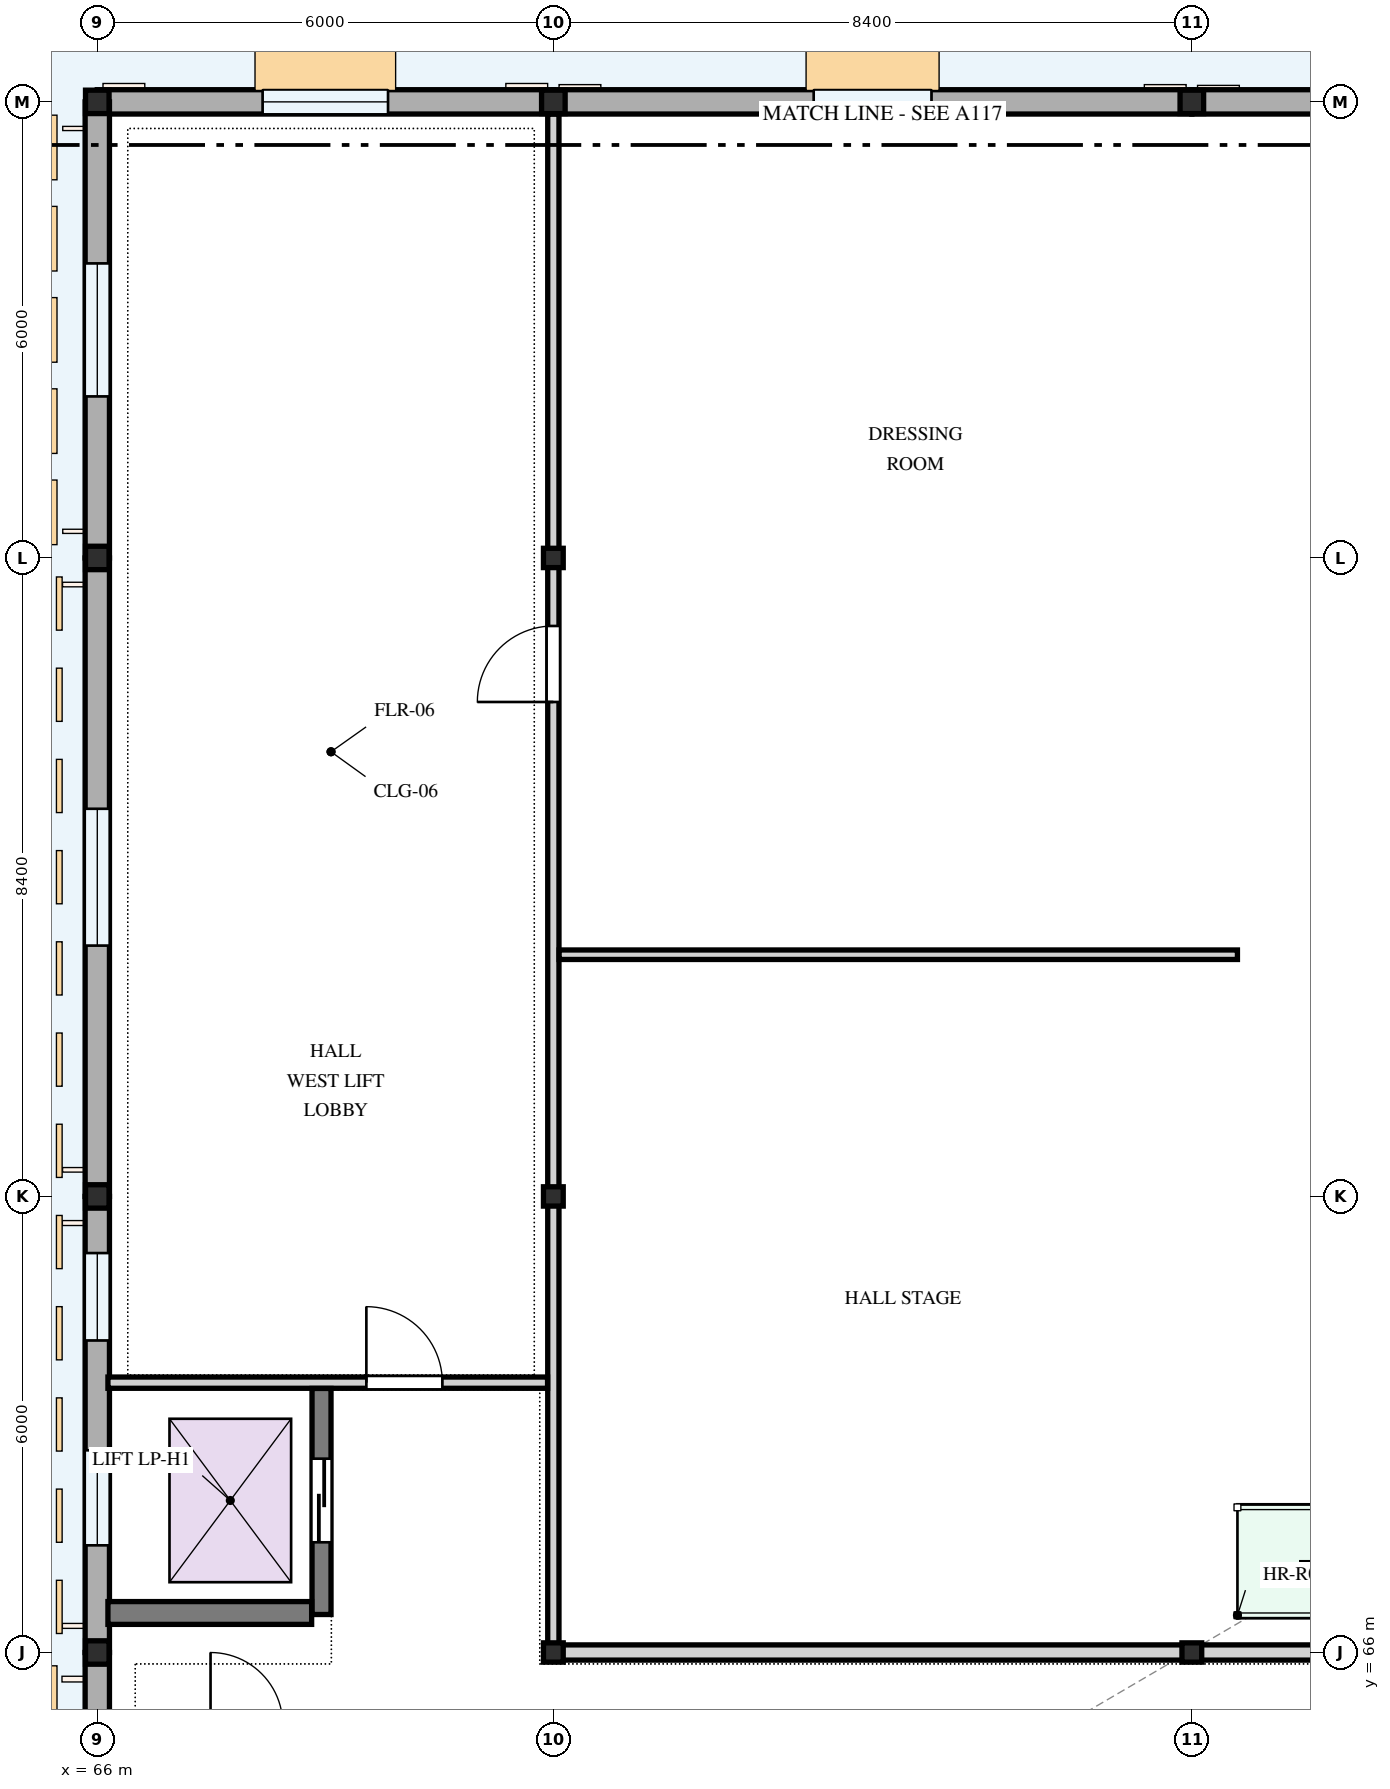
"""IFC4 building model, lengths in metres.
Left out: names, types, materials, properties, quantities, classifications, styles, units other than length and angle.
Written with IfcOpenShell. Run it as: python <this file> out.ifc"""

import sys

from ifc_helpers import new_model, si_unit, direction, frame, frame_2d, origin, origin_2d, place, context, subcontext, project, spatial, rectangle, i_section, extrude, element, fill, save


model = new_model("IFC4")
c1 = context("Model", 3, precision=1e-05, world=origin(), true_north=direction((0.0, 1.0)))
c2 = subcontext(c1, "Body", "Model", "MODEL_VIEW")
j1 = project(units=[si_unit("LENGTHUNIT", "METRE"), si_unit("PLANEANGLEUNIT", "RADIAN")], contexts=[c1])
p1 = place(None, origin())
s1 = spatial("IfcSite", under=j1, at=p1, CompositionType="ELEMENT")
p2 = place(p1, origin())
s2 = spatial("IfcBuilding", under=s1, at=p2, CompositionType="ELEMENT")
p3 = place(p2, origin())
s3 = spatial("IfcBuildingStorey", under=s2, at=p3, CompositionType="ELEMENT", Elevation=0.0)
for number, where, z_axis, x_axis in (
    (1, (66.0, 66.0, 0.0), (0.0, 0.0, 1.0), (1.0, 0.0, 0.0)),
    (2, (66.0, 72.0, 0.0), (0.0, 0.0, 1.0), (1.0, 0.0, 0.0)),
    (3, (66.0, 80.4, 0.0), (0.0, 0.0, 1.0), (1.0, 0.0, 0.0)),
    (4, (66.0, 86.4, 0.0), (0.0, 0.0, 1.0), (1.0, 0.0, 0.0)),
):
    element("IfcColumn", number, at=place(p3, frame(where, z_axis=z_axis, x_axis=x_axis)), inside=s3, PredefinedType="COLUMN", context=c2, shape_type="SweptSolid", body=[
        extrude(i_section(OverallWidth=0.31, OverallDepth=0.308, WebThickness=0.015, FlangeThickness=0.015, FilletRadius=0.012, at=origin_2d()), origin(), (0.0, 0.0, 1.0), 4.5),
    ])
for number, where, z_axis, x_axis in (
    (5, (72.0, 66.0, 0.0), (0.0, 0.0, 1.0), (1.0, 0.0, 0.0)),
    (6, (72.0, 72.0, 0.0), (0.0, 0.0, 1.0), (1.0, 0.0, 0.0)),
    (7, (72.0, 80.4, 0.0), (0.0, 0.0, 1.0), (1.0, 0.0, 0.0)),
):
    element("IfcColumn", number, at=place(p3, frame(where, z_axis=z_axis, x_axis=x_axis)), inside=s3, PredefinedType="COLUMN", context=c2, shape_type="SweptSolid", body=[
        extrude(i_section(OverallWidth=0.26, OverallDepth=0.254, WebThickness=0.014, FlangeThickness=0.014, FilletRadius=0.01, at=origin_2d()), origin(), (0.0, 0.0, 1.0), 4.5),
    ])
p4 = place(p3, frame((72.0, 86.4, 0.0), z_axis=(0.0, 0.0, 1.0), x_axis=(1.0, 0.0, 0.0)))
e8 = element("IfcColumn", 8, at=p4, inside=s3, PredefinedType="COLUMN", context=c2, shape_type="SweptSolid", body=[
    extrude(i_section(OverallWidth=0.31, OverallDepth=0.308, WebThickness=0.015, FlangeThickness=0.015, FilletRadius=0.012, at=origin_2d()), origin(), (0.0, 0.0, 1.0), 4.5),
])
p5 = place(p3, frame((80.4, 66.0, 0.0), z_axis=(0.0, 0.0, 1.0), x_axis=(1.0, 0.0, 0.0)))
e9 = element("IfcColumn", 9, at=p5, inside=s3, PredefinedType="COLUMN", context=c2, shape_type="SweptSolid", body=[
    extrude(i_section(OverallWidth=0.26, OverallDepth=0.254, WebThickness=0.014, FlangeThickness=0.014, FilletRadius=0.01, at=origin_2d()), origin(), (0.0, 0.0, 1.0), 4.5),
])
p6 = place(p3, frame((80.4, 86.4, 0.0), z_axis=(0.0, 0.0, 1.0), x_axis=(1.0, 0.0, 0.0)))
e10 = element("IfcColumn", 10, at=p6, inside=s3, PredefinedType="COLUMN", context=c2, shape_type="SweptSolid", body=[
    extrude(i_section(OverallWidth=0.31, OverallDepth=0.308, WebThickness=0.015, FlangeThickness=0.015, FilletRadius=0.012, at=origin_2d()), origin(), (0.0, 0.0, 1.0), 4.5),
])
p7 = place(p3, frame((86.4, 86.4, 0.0), z_axis=(0.0, 0.0, 1.0), x_axis=(-1.0, 0.0, 0.0)))
e11 = element("IfcWall", 11, at=p7, inside=s3, PredefinedType="STANDARD", context=c2, shape_type="SweptSolid", body=[
    extrude(rectangle(XDim=6.0, YDim=0.32, at=frame_2d((3.0, 0.0))), origin(), (0.0, 0.0, 1.0), 3.722),
])
p8 = place(p7, frame((2.25, 0.0, 0.85)))
e12 = element("IfcOpeningElement", 12, at=p8, cuts=e11, PredefinedType="OPENING", context=c2, shape_type="SweptSolid", body=[
    extrude(rectangle(XDim=1.5, YDim=1.5, at=frame_2d((0.75, 0.75))), frame((0.0, 0.17, 0.0), z_axis=(0.0, -1.0, 0.0), x_axis=(1.0, 0.0, 0.0)), (0.0, 0.0, 1.0), 0.34),
])
p9 = place(p3, frame((80.4, 86.4, 0.0), z_axis=(0.0, 0.0, 1.0), x_axis=(-1.0, 0.0, 0.0)))
e13 = element("IfcWall", 13, at=p9, inside=s3, PredefinedType="STANDARD", context=c2, shape_type="SweptSolid", body=[
    extrude(rectangle(XDim=8.4, YDim=0.32, at=frame_2d((4.2, 0.0))), origin(), (0.0, 0.0, 1.0), 3.646),
])
p10 = place(p9, frame((3.425, 0.0, 0.85)))
e14 = element("IfcOpeningElement", 14, at=p10, cuts=e13, PredefinedType="OPENING", context=c2, shape_type="SweptSolid", body=[
    extrude(rectangle(XDim=1.55, YDim=1.4, at=frame_2d((0.775, 0.7))), frame((0.0, 0.17, 0.0), z_axis=(0.0, -1.0, 0.0), x_axis=(1.0, 0.0, 0.0)), (0.0, 0.0, 1.0), 0.34),
])
p11 = place(p3, frame((72.0, 86.4, 0.0), z_axis=(0.0, 0.0, 1.0), x_axis=(-1.0, 0.0, 0.0)))
e15 = element("IfcWall", 15, at=p11, inside=s3, PredefinedType="STANDARD", context=c2, shape_type="SweptSolid", body=[
    extrude(rectangle(XDim=6.0, YDim=0.32, at=frame_2d((3.0, 0.0))), origin(), (0.0, 0.0, 1.0), 3.722),
])
p12 = place(p11, frame((2.175, 0.0, 0.85)))
e16 = element("IfcOpeningElement", 16, at=p12, cuts=e15, PredefinedType="OPENING", context=c2, shape_type="SweptSolid", body=[
    extrude(rectangle(XDim=1.65, YDim=1.5, at=frame_2d((0.825, 0.75))), frame((0.0, 0.17, 0.0), z_axis=(0.0, -1.0, 0.0), x_axis=(1.0, 0.0, 0.0)), (0.0, 0.0, 1.0), 0.34),
])
p13 = place(p3, frame((66.0, 86.4, 0.0), z_axis=(0.0, 0.0, 1.0), x_axis=(0.0, -1.0, 0.0)))
e17 = element("IfcWall", 17, at=p13, inside=s3, PredefinedType="STANDARD", context=c2, shape_type="SweptSolid", body=[
    extrude(rectangle(XDim=6.0, YDim=0.32, at=frame_2d((3.0, 0.0))), origin(), (0.0, 0.0, 1.0), 3.772),
])
p14 = place(p13, frame((2.125, 0.0, 0.85)))
e18 = element("IfcOpeningElement", 18, at=p14, cuts=e17, PredefinedType="OPENING", context=c2, shape_type="SweptSolid", body=[
    extrude(rectangle(XDim=1.75, YDim=1.45, at=frame_2d((0.875, 0.725))), frame((0.0, 0.17, 0.0), z_axis=(0.0, -1.0, 0.0), x_axis=(1.0, 0.0, 0.0)), (0.0, 0.0, 1.0), 0.34),
])
p15 = place(p3, frame((66.0, 80.4, 0.0), z_axis=(0.0, 0.0, 1.0), x_axis=(0.0, -1.0, 0.0)))
e19 = element("IfcWall", 19, at=p15, inside=s3, PredefinedType="STANDARD", context=c2, shape_type="SweptSolid", body=[
    extrude(rectangle(XDim=8.4, YDim=0.32, at=frame_2d((4.2, 0.0))), origin(), (0.0, 0.0, 1.0), 3.65),
])
p16 = place(p15, frame((3.3, 0.0, 0.85)))
e20 = element("IfcOpeningElement", 20, at=p16, cuts=e19, PredefinedType="OPENING", context=c2, shape_type="SweptSolid", body=[
    extrude(rectangle(XDim=1.8, YDim=1.5, at=frame_2d((0.9, 0.75))), frame((0.0, 0.17, 0.0), z_axis=(0.0, -1.0, 0.0), x_axis=(1.0, 0.0, 0.0)), (0.0, 0.0, 1.0), 0.34),
])
p17 = place(p3, frame((66.0, 72.0, 0.0), z_axis=(0.0, 0.0, 1.0), x_axis=(0.0, -1.0, 0.0)))
e21 = element("IfcWall", 21, at=p17, inside=s3, PredefinedType="STANDARD", context=c2, shape_type="SweptSolid", body=[
    extrude(rectangle(XDim=6.0, YDim=0.32, at=frame_2d((3.0, 0.0))), origin(), (0.0, 0.0, 1.0), 3.772),
])
p18 = place(p17, frame((0.745, 0.0, 0.85)))
e22 = element("IfcOpeningElement", 22, at=p18, cuts=e21, PredefinedType="OPENING", context=c2, shape_type="SweptSolid", body=[
    extrude(rectangle(XDim=1.15, YDim=1.25, at=frame_2d((0.575, 0.625))), frame((0.0, 0.17, 0.0), z_axis=(0.0, -1.0, 0.0), x_axis=(1.0, 0.0, 0.0)), (0.0, 0.0, 1.0), 0.34),
])
p19 = place(p17, frame((3.34, 0.0, 0.85)))
e23 = element("IfcOpeningElement", 23, at=p19, cuts=e21, PredefinedType="OPENING", context=c2, shape_type="SweptSolid", body=[
    extrude(rectangle(XDim=1.25, YDim=1.45, at=frame_2d((0.625, 0.725))), frame((0.0, 0.17, 0.0), z_axis=(0.0, -1.0, 0.0), x_axis=(1.0, 0.0, 0.0)), (0.0, 0.0, 1.0), 0.34),
])
p20 = place(p3, frame((66.0, 66.0, 0.0), z_axis=(0.0, 0.0, 1.0), x_axis=(0.0, -1.0, 0.0)))
e24 = element("IfcWall", 24, at=p20, inside=s3, PredefinedType="STANDARD", context=c2, shape_type="SweptSolid", body=[
    extrude(rectangle(XDim=8.4, YDim=0.32, at=frame_2d((4.2, 0.0))), origin(), (0.0, 0.0, 1.0), 3.65),
])
p21 = place(p20, frame((1.35, 0.0, 0.0)))
e25 = element("IfcOpeningElement", 25, at=p21, cuts=e24, PredefinedType="OPENING", context=c2, shape_type="SweptSolid", body=[
    extrude(rectangle(XDim=1.2, YDim=2.2, at=frame_2d((0.6, 1.1))), frame((0.0, 0.17, 0.0), z_axis=(0.0, -1.0, 0.0), x_axis=(1.0, 0.0, 0.0)), (0.0, 0.0, 1.0), 0.34),
])
p22 = place(p3, frame((72.0, 66.0, 0.0), z_axis=(0.0, 0.0, 1.0), x_axis=(1.0, 0.0, 0.0)))
e26 = element("IfcWall", 26, at=p22, inside=s3, PredefinedType="PARTITIONING", context=c2, shape_type="SweptSolid", body=[
    extrude(rectangle(XDim=37.2, YDim=0.2, at=frame_2d((18.6, 0.0))), origin(), (0.0, 0.0, 1.0), 3.266),
])
p23 = place(p22, frame((17.001, 0.0, 0.0)))
e27 = element("IfcOpeningElement", 27, at=p23, cuts=e26, PredefinedType="OPENING", context=c2, shape_type="SweptSolid", body=[
    extrude(rectangle(XDim=1.65, YDim=2.3, at=frame_2d((0.825, 1.15))), frame((0.0, 0.11, 0.0), z_axis=(0.0, -1.0, 0.0), x_axis=(1.0, 0.0, 0.0)), (0.0, 0.0, 1.0), 0.22),
])
p24 = place(p22, frame((25.391, 0.0, 0.0)))
e28 = element("IfcOpeningElement", 28, at=p24, cuts=e26, PredefinedType="OPENING", context=c2, shape_type="SweptSolid", body=[
    extrude(rectangle(XDim=1.8, YDim=2.4, at=frame_2d((0.9, 1.2))), frame((0.0, 0.11, 0.0), z_axis=(0.0, -1.0, 0.0), x_axis=(1.0, 0.0, 0.0)), (0.0, 0.0, 1.0), 0.22),
])
p25 = place(p3, frame((72.0, 66.102, 0.0), z_axis=(0.0, 0.0, 1.0), x_axis=(0.0, 1.0, 0.0)))
e29 = element("IfcWall", 29, at=p25, inside=s3, PredefinedType="PARTITIONING", context=c2, shape_type="SweptSolid", body=[
    extrude(rectangle(XDim=20.136, YDim=0.148, at=frame_2d((10.068, 0.0))), origin(), (0.0, 0.0, 1.0), 3.65),
])
p26 = place(p25, frame((12.403, 0.0, 0.0)))
e30 = element("IfcOpeningElement", 30, at=p26, cuts=e29, PredefinedType="OPENING", context=c2, shape_type="SweptSolid", body=[
    extrude(rectangle(XDim=1.0, YDim=2.15, at=frame_2d((0.5, 1.075))), frame((0.0, 0.084, 0.0), z_axis=(0.0, -1.0, 0.0), x_axis=(1.0, 0.0, 0.0)), (0.0, 0.0, 1.0), 0.168),
])
p27 = place(p3, frame((72.076, 75.18, 0.0), z_axis=(0.0, 0.0, 1.0), x_axis=(1.0, 0.0, 0.0)))
e31 = element("IfcWall", 31, at=p27, inside=s3, PredefinedType="PARTITIONING", context=c2, shape_type="SweptSolid", body=[
    extrude(rectangle(XDim=8.924, YDim=0.125, at=frame_2d((4.462, 0.0))), origin(), (0.0, 0.0, 1.0), 4.2),
])
p28 = place(p3, frame((66.14, 69.55, 0.0), z_axis=(0.0, 0.0, 1.0), x_axis=(1.0, 0.0, 0.0)))
e32 = element("IfcWall", 32, at=p28, inside=s3, PredefinedType="PARTITIONING", context=c2, shape_type="SweptSolid", body=[
    extrude(rectangle(XDim=5.784, YDim=0.148, at=frame_2d((2.892, 0.0))), origin(), (0.0, 0.0, 1.0), 4.2),
])
p29 = place(p28, frame((3.4, 0.0, 0.0)))
e33 = element("IfcOpeningElement", 33, at=p29, cuts=e32, PredefinedType="OPENING", context=c2, shape_type="SweptSolid", body=[
    extrude(rectangle(XDim=1.0, YDim=2.15, at=frame_2d((0.5, 1.075))), frame((0.0, 0.084, 0.0), z_axis=(0.0, -1.0, 0.0), x_axis=(1.0, 0.0, 0.0)), (0.0, 0.0, 1.0), 0.168),
])
p30 = place(p3, frame((68.95, 66.5, 0.0), z_axis=(0.0, 0.0, 1.0), x_axis=(0.0, 1.0, 0.0)))
e34 = element("IfcWall", 34, at=p30, inside=s3, PredefinedType="SHEAR", context=c2, shape_type="SweptSolid", body=[
    extrude(rectangle(XDim=2.974, YDim=0.25, at=frame_2d((1.487, 0.0))), origin(), (0.0, 0.0, 1.0), 4.2),
])
p31 = place(p30, frame((0.95, 0.0, 0.0)))
e35 = element("IfcOpeningElement", 35, at=p31, cuts=e34, PredefinedType="OPENING", context=c2, shape_type="SweptSolid", body=[
    extrude(rectangle(XDim=1.1, YDim=2.15, at=frame_2d((0.55, 1.075))), frame((0.0, 0.135, 0.0), z_axis=(0.0, -1.0, 0.0), x_axis=(1.0, 0.0, 0.0)), (0.0, 0.0, 1.0), 0.27),
])
p32 = place(p3, frame((66.14, 66.52, 0.0), z_axis=(0.0, 0.0, 1.0), x_axis=(1.0, 0.0, 0.0)))
e36 = element("IfcWall", 36, at=p32, inside=s3, PredefinedType="SHEAR", context=c2, shape_type="SweptSolid", body=[
    extrude(rectangle(XDim=2.68, YDim=0.3, at=frame_2d((1.34, 0.0))), origin(), (0.0, 0.0, 1.0), 4.2),
])
p33 = place(p10, origin())
e37 = element("IfcWindow", 37, at=p33, inside=s3, PartitioningType="SINGLE_PANEL", PredefinedType="WINDOW", context=c2, shape_type="SweptSolid", body=[
    extrude(rectangle(XDim=1.55, YDim=1.4, at=frame_2d((0.775, 0.7))), frame((0.0, 0.03, 0.0), z_axis=(0.0, -1.0, 0.0), x_axis=(1.0, 0.0, 0.0)), (0.0, 0.0, 1.0), 0.06),
])
fill(e14, e37)
p34 = place(p12, origin())
e38 = element("IfcWindow", 38, at=p34, inside=s3, PartitioningType="DOUBLE_PANEL_VERTICAL", PredefinedType="WINDOW", context=c2, shape_type="SweptSolid", body=[
    extrude(rectangle(XDim=1.65, YDim=1.5, at=frame_2d((0.825, 0.75))), frame((0.0, 0.03, 0.0), z_axis=(0.0, -1.0, 0.0), x_axis=(1.0, 0.0, 0.0)), (0.0, 0.0, 1.0), 0.06),
])
fill(e16, e38)
p35 = place(p14, origin())
e39 = element("IfcWindow", 39, at=p35, inside=s3, PartitioningType="DOUBLE_PANEL_VERTICAL", PredefinedType="WINDOW", context=c2, shape_type="SweptSolid", body=[
    extrude(rectangle(XDim=1.75, YDim=1.45, at=frame_2d((0.875, 0.725))), frame((0.0, 0.03, 0.0), z_axis=(0.0, -1.0, 0.0), x_axis=(1.0, 0.0, 0.0)), (0.0, 0.0, 1.0), 0.06),
])
fill(e18, e39)
p36 = place(p16, origin())
e40 = element("IfcWindow", 40, at=p36, inside=s3, PartitioningType="DOUBLE_PANEL_VERTICAL", PredefinedType="WINDOW", context=c2, shape_type="SweptSolid", body=[
    extrude(rectangle(XDim=1.8, YDim=1.5, at=frame_2d((0.9, 0.75))), frame((0.0, 0.03, 0.0), z_axis=(0.0, -1.0, 0.0), x_axis=(1.0, 0.0, 0.0)), (0.0, 0.0, 1.0), 0.06),
])
fill(e20, e40)
p37 = place(p18, origin())
e41 = element("IfcWindow", 41, at=p37, inside=s3, PartitioningType="SINGLE_PANEL", PredefinedType="WINDOW", context=c2, shape_type="SweptSolid", body=[
    extrude(rectangle(XDim=1.15, YDim=1.25, at=frame_2d((0.575, 0.625))), frame((0.0, 0.03, 0.0), z_axis=(0.0, -1.0, 0.0), x_axis=(1.0, 0.0, 0.0)), (0.0, 0.0, 1.0), 0.06),
])
fill(e22, e41)
p38 = place(p19, origin())
e42 = element("IfcWindow", 42, at=p38, inside=s3, PartitioningType="SINGLE_PANEL", PredefinedType="WINDOW", context=c2, shape_type="SweptSolid", body=[
    extrude(rectangle(XDim=1.25, YDim=1.45, at=frame_2d((0.625, 0.725))), frame((0.0, 0.03, 0.0), z_axis=(0.0, -1.0, 0.0), x_axis=(1.0, 0.0, 0.0)), (0.0, 0.0, 1.0), 0.06),
])
fill(e23, e42)
p39 = place(p26, origin())
e43 = element("IfcDoor", 43, at=p39, inside=s3, OperationType="SINGLE_SWING_LEFT", PredefinedType="DOOR", context=c2, shape_type="SweptSolid", body=[
    extrude(rectangle(XDim=1.0, YDim=2.15, at=frame_2d((0.5, 1.075))), frame((0.0, 0.025, 0.0), z_axis=(0.0, -1.0, 0.0), x_axis=(1.0, 0.0, 0.0)), (0.0, 0.0, 1.0), 0.05),
])
fill(e30, e43)
p40 = place(p29, origin())
e44 = element("IfcDoor", 44, at=p40, inside=s3, OperationType="SINGLE_SWING_LEFT", PredefinedType="DOOR", context=c2, shape_type="SweptSolid", body=[
    extrude(rectangle(XDim=1.0, YDim=2.15, at=frame_2d((0.5, 1.075))), frame((0.0, 0.025, 0.0), z_axis=(0.0, -1.0, 0.0), x_axis=(1.0, 0.0, 0.0)), (0.0, 0.0, 1.0), 0.05),
])
fill(e33, e44)
p41 = place(p31, origin())
e45 = element("IfcDoor", 45, at=p41, inside=s3, OperationType="SLIDING_TO_LEFT", PredefinedType="DOOR", context=c2, shape_type="SweptSolid", body=[
    extrude(rectangle(XDim=1.1, YDim=2.15, at=frame_2d((0.55, 1.075))), frame((0.0, 0.025, 0.0), z_axis=(0.0, -1.0, 0.0), x_axis=(1.0, 0.0, 0.0)), (0.0, 0.0, 1.0), 0.05),
])
fill(e35, e45)
save(model, sys.argv[1])
